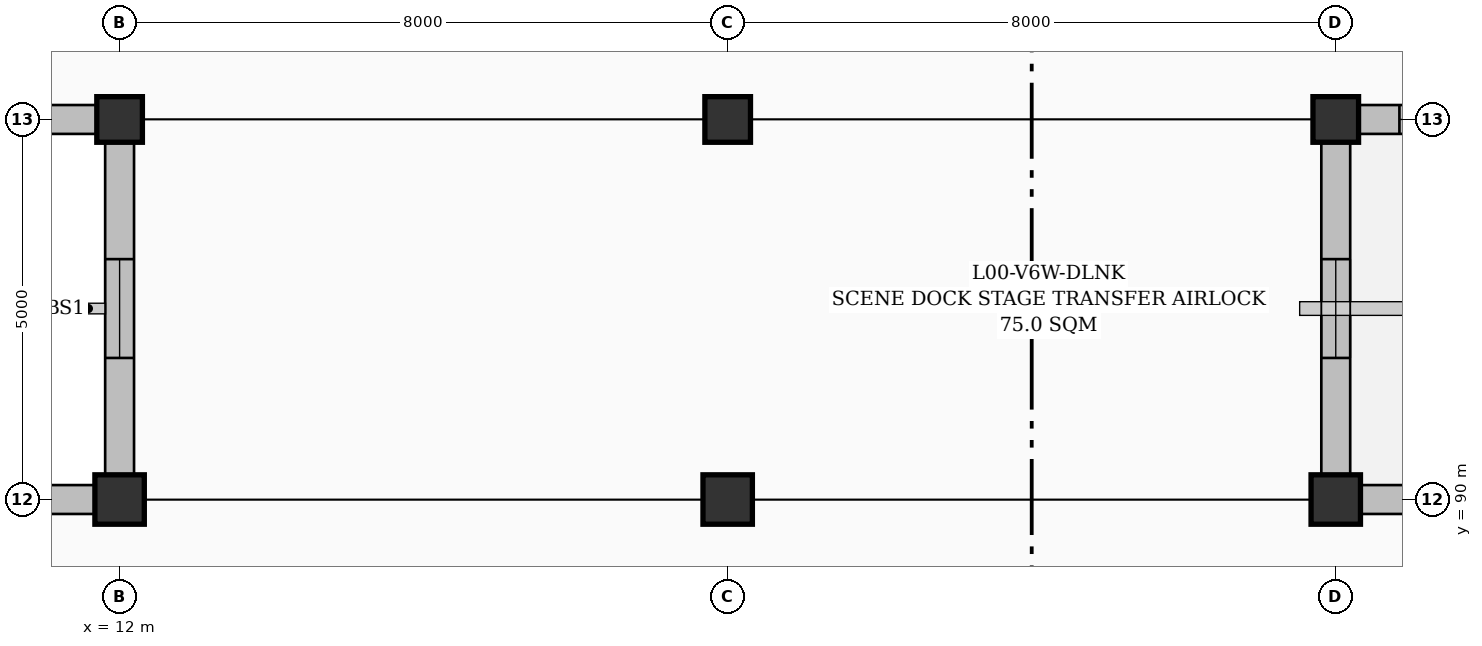
"""IFC4 building model, lengths in metres.
Left out: names, types, materials, properties, quantities, classifications, styles, units other than length and angle.
Written with IfcOpenShell. Run it as: python <this file> out.ifc"""

import sys

from ifc_helpers import new_model, si_unit, direction, frame, frame_2d, origin, origin_2d, place, context, subcontext, project, spatial, rectangle, extrude, element, fill, save


model = new_model("IFC4")
c1 = context("Model", 3, precision=1e-05, world=origin(), true_north=direction((0.0, 1.0)))
c2 = subcontext(c1, "Body", "Model", "MODEL_VIEW")
j1 = project(units=[si_unit("LENGTHUNIT", "METRE"), si_unit("PLANEANGLEUNIT", "RADIAN")], contexts=[c1])
p1 = place(None, origin())
s1 = spatial("IfcSite", under=j1, at=p1, CompositionType="ELEMENT")
p2 = place(p1, origin())
s2 = spatial("IfcBuilding", under=s1, at=p2, CompositionType="ELEMENT")
p3 = place(p2, origin())
s3 = spatial("IfcBuildingStorey", under=s2, at=p3, CompositionType="ELEMENT", Elevation=0.0)
p4 = place(p3, frame((12.0, 90.0, 0.0), z_axis=(0.0, 0.0, 1.0), x_axis=(1.0, 0.0, 0.0)))
e1 = element("IfcColumn", 1, at=p4, inside=s3, PredefinedType="COLUMN", context=c2, shape_type="SweptSolid", body=[
    extrude(rectangle(XDim=0.65, YDim=0.65, at=origin_2d()), origin(), (0.0, 0.0, 1.0), 4.8),
])
p5 = place(p3, frame((12.0, 95.0, 0.0), z_axis=(0.0, 0.0, 1.0), x_axis=(1.0, 0.0, 0.0)))
e2 = element("IfcColumn", 2, at=p5, inside=s3, PredefinedType="COLUMN", context=c2, shape_type="SweptSolid", body=[
    extrude(rectangle(XDim=0.6, YDim=0.6, at=origin_2d()), origin(), (0.0, 0.0, 1.0), 4.8),
])
p6 = place(p3, frame((20.0, 90.0, 0.0), z_axis=(0.0, 0.0, 1.0), x_axis=(1.0, 0.0, 0.0)))
e3 = element("IfcColumn", 3, at=p6, inside=s3, PredefinedType="COLUMN", context=c2, shape_type="SweptSolid", body=[
    extrude(rectangle(XDim=0.65, YDim=0.65, at=origin_2d()), origin(), (0.0, 0.0, 1.0), 4.8),
])
p7 = place(p3, frame((20.0, 95.0, 0.0), z_axis=(0.0, 0.0, 1.0), x_axis=(1.0, 0.0, 0.0)))
e4 = element("IfcColumn", 4, at=p7, inside=s3, PredefinedType="COLUMN", context=c2, shape_type="SweptSolid", body=[
    extrude(rectangle(XDim=0.6, YDim=0.6, at=origin_2d()), origin(), (0.0, 0.0, 1.0), 4.8),
])
p8 = place(p3, frame((28.0, 90.0, 0.0), z_axis=(0.0, 0.0, 1.0), x_axis=(1.0, 0.0, 0.0)))
e5 = element("IfcColumn", 5, at=p8, inside=s3, PredefinedType="COLUMN", context=c2, shape_type="SweptSolid", body=[
    extrude(rectangle(XDim=0.65, YDim=0.65, at=origin_2d()), origin(), (0.0, 0.0, 1.0), 4.8),
])
p9 = place(p3, frame((28.0, 95.0, 0.0), z_axis=(0.0, 0.0, 1.0), x_axis=(1.0, 0.0, 0.0)))
e6 = element("IfcColumn", 6, at=p9, inside=s3, PredefinedType="COLUMN", context=c2, shape_type="SweptSolid", body=[
    extrude(rectangle(XDim=0.6, YDim=0.6, at=origin_2d()), origin(), (0.0, 0.0, 1.0), 4.8),
])
p10 = place(p3, frame((8.25, 90.0, 0.0), z_axis=(0.0, 0.0, 1.0), x_axis=(1.0, 0.0, 0.0)))
e7 = element("IfcWall", 7, at=p10, inside=s3, PredefinedType="SOLIDWALL", context=c2, shape_type="SweptSolid", body=[
    extrude(rectangle(XDim=3.425, YDim=0.38, at=frame_2d((1.712, 0.0))), origin(), (0.0, 0.0, 1.0), 4.235),
])
p11 = place(p10, frame((0.663, 0.0, 0.95)))
e8 = element("IfcOpeningElement", 8, at=p11, cuts=e7, PredefinedType="OPENING", context=c2, shape_type="SweptSolid", body=[
    extrude(rectangle(XDim=2.1, YDim=1.5, at=frame_2d((1.05, 0.75))), frame((0.0, 0.2, 0.0), z_axis=(0.0, -1.0, 0.0), x_axis=(1.0, 0.0, 0.0)), (0.0, 0.0, 1.0), 0.4),
])
p12 = place(p3, frame((28.325, 90.0, 0.0), z_axis=(0.0, 0.0, 1.0), x_axis=(1.0, 0.0, 0.0)))
e9 = element("IfcWall", 9, at=p12, inside=s3, PredefinedType="SOLIDWALL", context=c2, shape_type="SweptSolid", body=[
    extrude(rectangle(XDim=3.425, YDim=0.38, at=frame_2d((1.712, 0.0))), origin(), (0.0, 0.0, 1.0), 3.935),
])
p13 = place(p12, frame((0.812, 0.0, 0.0)))
e10 = element("IfcOpeningElement", 10, at=p13, cuts=e9, PredefinedType="OPENING", context=c2, shape_type="SweptSolid", body=[
    extrude(rectangle(XDim=1.8, YDim=2.25, at=frame_2d((0.9, 1.125))), frame((0.0, 0.2, 0.0), z_axis=(0.0, -1.0, 0.0), x_axis=(1.0, 0.0, 0.0)), (0.0, 0.0, 1.0), 0.4),
])
p14 = place(p3, frame((31.775, 95.0, 0.0), z_axis=(0.0, 0.0, 1.0), x_axis=(-1.0, 0.0, 0.0)))
e11 = element("IfcWall", 11, at=p14, inside=s3, PredefinedType="SOLIDWALL", context=c2, shape_type="SweptSolid", body=[
    extrude(rectangle(XDim=3.475, YDim=0.38, at=frame_2d((1.737, 0.0))), origin(), (0.0, 0.0, 1.0), 4.235),
])
p15 = place(p14, frame((0.538, 0.0, 0.95)))
e12 = element("IfcOpeningElement", 12, at=p15, cuts=e11, PredefinedType="OPENING", context=c2, shape_type="SweptSolid", body=[
    extrude(rectangle(XDim=2.4, YDim=1.8, at=frame_2d((1.2, 0.9))), frame((0.0, 0.2, 0.0), z_axis=(0.0, -1.0, 0.0), x_axis=(1.0, 0.0, 0.0)), (0.0, 0.0, 1.0), 0.4),
])
p16 = place(p3, frame((11.7, 95.0, 0.0), z_axis=(0.0, 0.0, 1.0), x_axis=(-1.0, 0.0, 0.0)))
e13 = element("IfcWall", 13, at=p16, inside=s3, PredefinedType="SOLIDWALL", context=c2, shape_type="SweptSolid", body=[
    extrude(rectangle(XDim=3.475, YDim=0.38, at=frame_2d((1.737, 0.0))), origin(), (0.0, 0.0, 1.0), 4.035),
])
p17 = place(p16, frame((0.837, 0.0, 0.95)))
e14 = element("IfcOpeningElement", 14, at=p17, cuts=e13, PredefinedType="OPENING", context=c2, shape_type="SweptSolid", body=[
    extrude(rectangle(XDim=1.8, YDim=1.5, at=frame_2d((0.9, 0.75))), frame((0.0, 0.2, 0.0), z_axis=(0.0, -1.0, 0.0), x_axis=(1.0, 0.0, 0.0)), (0.0, 0.0, 1.0), 0.4),
])
p18 = place(p3, frame((12.0, 90.325, 0.0), z_axis=(0.0, 0.0, 1.0), x_axis=(0.0, 1.0, 0.0)))
e15 = element("IfcWall", 15, at=p18, inside=s3, PredefinedType="SOLIDWALL", context=c2, shape_type="SweptSolid", body=[
    extrude(rectangle(XDim=4.375, YDim=0.38, at=frame_2d((2.188, 0.0))), origin(), (0.0, 0.0, 1.0), 3.945),
])
p19 = place(p18, frame((1.538, 0.0, 0.95)))
e16 = element("IfcOpeningElement", 16, at=p19, cuts=e15, PredefinedType="OPENING", context=c2, shape_type="SweptSolid", body=[
    extrude(rectangle(XDim=1.3, YDim=1.4, at=frame_2d((0.65, 0.7))), frame((0.0, 0.2, 0.0), z_axis=(0.0, -1.0, 0.0), x_axis=(1.0, 0.0, 0.0)), (0.0, 0.0, 1.0), 0.4),
])
p20 = place(p3, frame((28.0, 94.7, 0.0), z_axis=(0.0, 0.0, 1.0), x_axis=(0.0, -1.0, 0.0)))
e17 = element("IfcWall", 17, at=p20, inside=s3, PredefinedType="SOLIDWALL", context=c2, shape_type="SweptSolid", body=[
    extrude(rectangle(XDim=4.375, YDim=0.38, at=frame_2d((2.188, 0.0))), origin(), (0.0, 0.0, 1.0), 3.945),
])
p21 = place(p20, frame((1.538, 0.0, 0.95)))
e18 = element("IfcOpeningElement", 18, at=p21, cuts=e17, PredefinedType="OPENING", context=c2, shape_type="SweptSolid", body=[
    extrude(rectangle(XDim=1.3, YDim=1.4, at=frame_2d((0.65, 0.7))), frame((0.0, 0.2, 0.0), z_axis=(0.0, -1.0, 0.0), x_axis=(1.0, 0.0, 0.0)), (0.0, 0.0, 1.0), 0.4),
])
p22 = place(p15, origin())
e19 = element("IfcWindow", 19, at=p22, inside=s3, PartitioningType="TRIPLE_PANEL_VERTICAL", PredefinedType="WINDOW", context=c2, shape_type="SweptSolid", body=[
    extrude(rectangle(XDim=2.4, YDim=1.8, at=frame_2d((1.2, 0.9))), frame((0.0, 0.03, 0.0), z_axis=(0.0, -1.0, 0.0), x_axis=(1.0, 0.0, 0.0)), (0.0, 0.0, 1.0), 0.06),
])
fill(e12, e19)
p23 = place(p19, origin())
e20 = element("IfcWindow", 20, at=p23, inside=s3, PartitioningType="SINGLE_PANEL", PredefinedType="WINDOW", context=c2, shape_type="SweptSolid", body=[
    extrude(rectangle(XDim=1.3, YDim=1.4, at=frame_2d((0.65, 0.7))), frame((0.0, 0.03, 0.0), z_axis=(0.0, -1.0, 0.0), x_axis=(1.0, 0.0, 0.0)), (0.0, 0.0, 1.0), 0.06),
])
fill(e16, e20)
p24 = place(p21, origin())
e21 = element("IfcWindow", 21, at=p24, inside=s3, PartitioningType="SINGLE_PANEL", PredefinedType="WINDOW", context=c2, shape_type="SweptSolid", body=[
    extrude(rectangle(XDim=1.3, YDim=1.4, at=frame_2d((0.65, 0.7))), frame((0.0, 0.03, 0.0), z_axis=(0.0, -1.0, 0.0), x_axis=(1.0, 0.0, 0.0)), (0.0, 0.0, 1.0), 0.06),
])
fill(e18, e21)
save(model, sys.argv[1])
